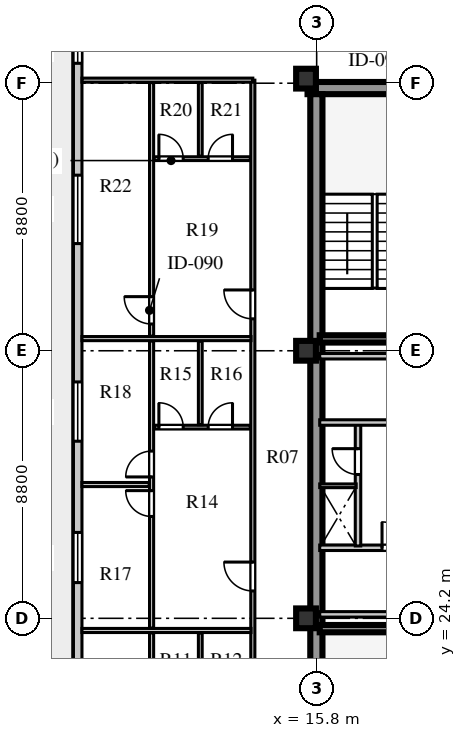
"""IFC4 building model, lengths in metres.
Left out: names, types, materials, properties, quantities, classifications, styles, units other than length and angle.
Written with IfcOpenShell. Run it as: python <this file> out.ifc"""

import sys

from ifc_helpers import new_model, si_unit, direction, frame, frame_2d, origin, origin_2d, place, context, subcontext, project, spatial, rectangle, extrude, element, fill, save


model = new_model("IFC4")
c1 = context("Model", 3, precision=1e-05, world=origin(), true_north=direction((0.0, 1.0)))
c2 = subcontext(c1, "Body", "Model", "MODEL_VIEW")
j1 = project(units=[si_unit("LENGTHUNIT", "METRE"), si_unit("PLANEANGLEUNIT", "RADIAN")], contexts=[c1])
p1 = place(None, origin())
s1 = spatial("IfcSite", under=j1, at=p1, CompositionType="ELEMENT")
p2 = place(p1, origin())
s2 = spatial("IfcBuilding", under=s1, at=p2, CompositionType="ELEMENT")
p3 = place(p2, frame((0.0, 0.0, 229.7)))
s3 = spatial("IfcBuildingStorey", under=s2, at=p3, CompositionType="ELEMENT", Elevation=229.7)
p4 = place(p3, frame((15.5, 41.64, 0.0), z_axis=(0.0, 0.0, 1.0), x_axis=(1.0, 0.0, 0.0)))
e1 = element("IfcWall", 1, at=p4, inside=s3, PredefinedType="SHEAR", context=c2, shape_type="SweptSolid", body=[
    extrude(rectangle(XDim=9.48, YDim=0.4, at=frame_2d((4.74, 0.0))), origin(), (0.0, 0.0, 1.0), 3.66),
])
p5 = place(p3, frame((15.79, 15.81, 0.0), z_axis=(0.0, 0.0, 1.0), x_axis=(0.0, 1.0, 0.0)))
e2 = element("IfcWall", 2, at=p5, inside=s3, PredefinedType="SHEAR", context=c2, shape_type="SweptSolid", body=[
    extrude(rectangle(XDim=25.63, YDim=0.4, at=frame_2d((12.815, 0.0))), origin(), (0.0, 0.0, 1.0), 3.66),
])
for number, where, z_axis, x_axis in (
    (3, (15.45, 24.2, 0.0), (0.0, 0.0, 1.0), (1.0, 0.0, 0.0)),
    (4, (15.45, 33.0, 0.0), (0.0, 0.0, 1.0), (1.0, 0.0, 0.0)),
    (5, (15.45, 41.95, 0.0), (0.0, 0.0, 1.0), (1.0, 0.0, 0.0)),
):
    element("IfcColumn", number, at=place(p3, frame(where, z_axis=z_axis, x_axis=x_axis)), inside=s3, PredefinedType="COLUMN", context=c2, shape_type="SweptSolid", body=[
        extrude(rectangle(XDim=0.65, YDim=0.65, at=origin_2d()), origin(), (0.0, 0.0, 1.0), 3.66),
    ])
p6 = place(p3, frame((7.94, 44.07, 0.0), z_axis=(0.0, 0.0, 1.0), x_axis=(0.0, -1.0, 0.0)))
e6 = element("IfcWall", 6, at=p6, inside=s3, PredefinedType="STANDARD", context=c2, shape_type="SweptSolid", body=[
    extrude(rectangle(XDim=30.94, YDim=0.28, at=frame_2d((15.47, 0.0))), origin(), (0.0, 0.0, 1.0), 3.66),
])
p7 = place(p6, frame((29.325, 0.0, 0.8)))
e7 = element("IfcOpeningElement", 7, at=p7, cuts=e6, PredefinedType="OPENING", context=c2, shape_type="SweptSolid", body=[
    extrude(rectangle(XDim=0.95, YDim=1.65, at=frame_2d((0.475, 0.825))), frame((0.0, 0.15, 0.0), z_axis=(0.0, -1.0, 0.0), x_axis=(1.0, 0.0, 0.0)), (0.0, 0.0, 1.0), 0.3),
])
p8 = place(p6, frame((27.28, 0.0, 0.0)))
e8 = element("IfcOpeningElement", 8, at=p8, cuts=e6, PredefinedType="OPENING", context=c2, shape_type="SweptSolid", body=[
    extrude(rectangle(XDim=1.0, YDim=2.05, at=frame_2d((0.5, 1.025))), frame((0.0, 0.15, 0.0), z_axis=(0.0, -1.0, 0.0), x_axis=(1.0, 0.0, 0.0)), (0.0, 0.0, 1.0), 0.3),
])
p9 = place(p6, frame((23.07, 0.0, 0.8)))
e9 = element("IfcOpeningElement", 9, at=p9, cuts=e6, PredefinedType="OPENING", context=c2, shape_type="SweptSolid", body=[
    extrude(rectangle(XDim=1.35, YDim=1.9, at=frame_2d((0.675, 0.95))), frame((0.0, 0.15, 0.0), z_axis=(0.0, -1.0, 0.0), x_axis=(1.0, 0.0, 0.0)), (0.0, 0.0, 1.0), 0.3),
])
p10 = place(p6, frame((17.045, 0.0, 0.8)))
e10 = element("IfcOpeningElement", 10, at=p10, cuts=e6, PredefinedType="OPENING", context=c2, shape_type="SweptSolid", body=[
    extrude(rectangle(XDim=1.65, YDim=1.95, at=frame_2d((0.825, 0.975))), frame((0.0, 0.15, 0.0), z_axis=(0.0, -1.0, 0.0), x_axis=(1.0, 0.0, 0.0)), (0.0, 0.0, 1.0), 0.3),
])
p11 = place(p6, frame((12.095, 0.0, 0.8)))
e11 = element("IfcOpeningElement", 11, at=p11, cuts=e6, PredefinedType="OPENING", context=c2, shape_type="SweptSolid", body=[
    extrude(rectangle(XDim=1.95, YDim=2.0, at=frame_2d((0.975, 1.0))), frame((0.0, 0.15, 0.0), z_axis=(0.0, -1.0, 0.0), x_axis=(1.0, 0.0, 0.0)), (0.0, 0.0, 1.0), 0.3),
])
p12 = place(p6, frame((5.295, 0.0, 0.8)))
e12 = element("IfcOpeningElement", 12, at=p12, cuts=e6, PredefinedType="OPENING", context=c2, shape_type="SweptSolid", body=[
    extrude(rectangle(XDim=2.25, YDim=2.0, at=frame_2d((1.125, 1.0))), frame((0.0, 0.15, 0.0), z_axis=(0.0, -1.0, 0.0), x_axis=(1.0, 0.0, 0.0)), (0.0, 0.0, 1.0), 0.3),
])
p13 = place(p6, frame((0.665, 0.0, 0.8)))
e13 = element("IfcOpeningElement", 13, at=p13, cuts=e6, PredefinedType="OPENING", context=c2, shape_type="SweptSolid", body=[
    extrude(rectangle(XDim=0.95, YDim=1.65, at=frame_2d((0.475, 0.825))), frame((0.0, 0.15, 0.0), z_axis=(0.0, -1.0, 0.0), x_axis=(1.0, 0.0, 0.0)), (0.0, 0.0, 1.0), 0.3),
])
p14 = place(p3, frame((15.9, 23.86, 0.0), z_axis=(0.0, 0.0, 1.0), x_axis=(1.0, 0.0, 0.0)))
e14 = element("IfcWall", 14, at=p14, inside=s3, PredefinedType="SHEAR", context=c2, shape_type="SweptSolid", body=[
    extrude(rectangle(XDim=3.52, YDim=0.24, at=frame_2d((1.76, 0.0))), origin(), (0.0, 0.0, 1.0), 3.9),
])
p15 = place(p3, frame((15.9, 26.52, 0.0), z_axis=(0.0, 0.0, 1.0), x_axis=(1.0, 0.0, 0.0)))
e15 = element("IfcWall", 15, at=p15, inside=s3, PredefinedType="SOLIDWALL", context=c2, shape_type="SweptSolid", body=[
    extrude(rectangle(XDim=8.68, YDim=0.18, at=frame_2d((4.34, 0.0))), origin(), (0.0, 0.0, 1.0), 3.66),
])
p16 = place(p15, frame((2.05, 0.0, 0.0)))
e16 = element("IfcOpeningElement", 16, at=p16, cuts=e15, PredefinedType="OPENING", context=c2, shape_type="SweptSolid", body=[
    extrude(rectangle(XDim=0.85, YDim=2.06, at=frame_2d((0.425, 1.03))), frame((0.0, 0.1, 0.0), z_axis=(0.0, -1.0, 0.0), x_axis=(1.0, 0.0, 0.0)), (0.0, 0.0, 1.0), 0.2),
])
p17 = place(p15, frame((5.2, 0.0, 0.0)))
e17 = element("IfcOpeningElement", 17, at=p17, cuts=e15, PredefinedType="OPENING", context=c2, shape_type="SweptSolid", body=[
    extrude(rectangle(XDim=0.95, YDim=2.1, at=frame_2d((0.475, 1.05))), frame((0.0, 0.1, 0.0), z_axis=(0.0, -1.0, 0.0), x_axis=(1.0, 0.0, 0.0)), (0.0, 0.0, 1.0), 0.2),
])
p18 = place(p3, frame((15.9, 24.33, 0.0), z_axis=(0.0, 0.0, 1.0), x_axis=(1.0, 0.0, 0.0)))
e18 = element("IfcWall", 18, at=p18, inside=s3, PredefinedType="SOLIDWALL", context=c2, shape_type="SweptSolid", body=[
    extrude(rectangle(XDim=8.68, YDim=0.18, at=frame_2d((4.34, 0.0))), origin(), (0.0, 0.0, 1.0), 3.06),
])
p19 = place(p3, frame((17.16, 26.58, 0.0), z_axis=(0.0, 0.0, 1.0), x_axis=(0.0, 1.0, 0.0)))
e19 = element("IfcWall", 19, at=p19, inside=s3, PredefinedType="SOLIDWALL", context=c2, shape_type="SweptSolid", body=[
    extrude(rectangle(XDim=4.02, YDim=0.18, at=frame_2d((2.01, 0.0))), origin(), (0.0, 0.0, 1.0), 3.66),
])
p20 = place(p19, frame((2.35, 0.0, 0.0)))
e20 = element("IfcOpeningElement", 20, at=p20, cuts=e19, PredefinedType="OPENING", context=c2, shape_type="SweptSolid", body=[
    extrude(rectangle(XDim=0.85, YDim=2.06, at=frame_2d((0.425, 1.03))), frame((0.0, 0.1, 0.0), z_axis=(0.0, -1.0, 0.0), x_axis=(1.0, 0.0, 0.0)), (0.0, 0.0, 1.0), 0.2),
])
p21 = place(p3, frame((15.9, 28.56, 0.0), z_axis=(0.0, 0.0, 1.0), x_axis=(1.0, 0.0, 0.0)))
e21 = element("IfcWall", 21, at=p21, inside=s3, PredefinedType="PARTITIONING", context=c2, shape_type="SweptSolid", body=[
    extrude(rectangle(XDim=1.2, YDim=0.12, at=frame_2d((0.6, 0.0))), origin(), (0.0, 0.0, 1.0), 3.66),
])
p22 = place(p3, frame((15.9, 30.64, 0.0), z_axis=(0.0, 0.0, 1.0), x_axis=(1.0, 0.0, 0.0)))
e22 = element("IfcWall", 22, at=p22, inside=s3, PredefinedType="SOLIDWALL", context=c2, shape_type="SweptSolid", body=[
    extrude(rectangle(XDim=8.68, YDim=0.18, at=frame_2d((4.34, 0.0))), origin(), (0.0, 0.0, 1.0), 3.66),
])
p23 = place(p22, frame((3.7, 0.0, 0.0)))
e23 = element("IfcOpeningElement", 23, at=p23, cuts=e22, PredefinedType="OPENING", context=c2, shape_type="SweptSolid", body=[
    extrude(rectangle(XDim=0.95, YDim=2.1, at=frame_2d((0.475, 1.05))), frame((0.0, 0.1, 0.0), z_axis=(0.0, -1.0, 0.0), x_axis=(1.0, 0.0, 0.0)), (0.0, 0.0, 1.0), 0.2),
])
p24 = place(p3, frame((15.9, 32.82, 0.0), z_axis=(0.0, 0.0, 1.0), x_axis=(1.0, 0.0, 0.0)))
e24 = element("IfcWall", 24, at=p24, inside=s3, PredefinedType="SOLIDWALL", context=c2, shape_type="SweptSolid", body=[
    extrude(rectangle(XDim=8.68, YDim=0.18, at=frame_2d((4.34, 0.0))), origin(), (0.0, 0.0, 1.0), 3.06),
])
p25 = place(p3, frame((15.9, 33.39, 0.0), z_axis=(0.0, 0.0, 1.0), x_axis=(1.0, 0.0, 0.0)))
e25 = element("IfcWall", 25, at=p25, inside=s3, PredefinedType="SHEAR", context=c2, shape_type="SweptSolid", body=[
    extrude(rectangle(XDim=3.52, YDim=0.24, at=frame_2d((1.76, 0.0))), origin(), (0.0, 0.0, 1.0), 3.9),
])
p26 = place(p3, frame((13.7, 15.3, 0.0), z_axis=(0.0, 0.0, 1.0), x_axis=(0.0, 1.0, 0.0)))
e26 = element("IfcWall", 26, at=p26, inside=s3, PredefinedType="PARTITIONING", context=c2, shape_type="SweptSolid", body=[
    extrude(rectangle(XDim=26.6, YDim=0.135, at=frame_2d((13.3, 0.0))), origin(), (0.0, 0.0, 1.0), 3.66),
])
p27 = place(p26, frame((0.65, 0.0, 0.0)))
e27 = element("IfcOpeningElement", 27, at=p27, cuts=e26, PredefinedType="OPENING", context=c2, shape_type="SweptSolid", body=[
    extrude(rectangle(XDim=0.95, YDim=2.1, at=frame_2d((0.475, 1.05))), frame((0.0, 0.078, 0.0), z_axis=(0.0, -1.0, 0.0), x_axis=(1.0, 0.0, 0.0)), (0.0, 0.0, 1.0), 0.155),
])
p28 = place(p26, frame((9.8, 0.0, 0.0)))
e28 = element("IfcOpeningElement", 28, at=p28, cuts=e26, PredefinedType="OPENING", context=c2, shape_type="SweptSolid", body=[
    extrude(rectangle(XDim=0.95, YDim=2.1, at=frame_2d((0.475, 1.05))), frame((0.0, 0.078, 0.0), z_axis=(0.0, -1.0, 0.0), x_axis=(1.0, 0.0, 0.0)), (0.0, 0.0, 1.0), 0.155),
])
p29 = place(p26, frame((18.75, 0.0, 0.0)))
e29 = element("IfcOpeningElement", 29, at=p29, cuts=e26, PredefinedType="OPENING", context=c2, shape_type="SweptSolid", body=[
    extrude(rectangle(XDim=0.95, YDim=2.1, at=frame_2d((0.475, 1.05))), frame((0.0, 0.078, 0.0), z_axis=(0.0, -1.0, 0.0), x_axis=(1.0, 0.0, 0.0)), (0.0, 0.0, 1.0), 0.155),
])
p30 = place(p3, frame((8.08, 41.9, 0.0), z_axis=(0.0, 0.0, 1.0), x_axis=(1.0, 0.0, 0.0)))
e30 = element("IfcWall", 30, at=p30, inside=s3, PredefinedType="PARTITIONING", context=c2, shape_type="SweptSolid", body=[
    extrude(rectangle(XDim=5.62, YDim=0.135, at=frame_2d((2.81, 0.0))), origin(), (0.0, 0.0, 1.0), 3.21),
])
p31 = place(p3, frame((10.37, 15.38, 0.0), z_axis=(0.0, 0.0, 1.0), x_axis=(0.0, 1.0, 0.0)))
e31 = element("IfcWall", 31, at=p31, inside=s3, PredefinedType="PARTITIONING", context=c2, shape_type="SweptSolid", body=[
    extrude(rectangle(XDim=8.34, YDim=0.135, at=frame_2d((4.17, 0.0))), origin(), (0.0, 0.0, 1.0), 3.66),
])
p32 = place(p31, frame((0.4, 0.0, 0.0)))
e32 = element("IfcOpeningElement", 32, at=p32, cuts=e31, PredefinedType="OPENING", context=c2, shape_type="SweptSolid", body=[
    extrude(rectangle(XDim=0.9, YDim=2.08, at=frame_2d((0.45, 1.04))), frame((0.0, 0.078, 0.0), z_axis=(0.0, -1.0, 0.0), x_axis=(1.0, 0.0, 0.0)), (0.0, 0.0, 1.0), 0.155),
])
p33 = place(p3, frame((11.972, 21.298, 0.0), z_axis=(0.0, 0.0, 1.0), x_axis=(0.0, 1.0, 0.0)))
e33 = element("IfcWall", 33, at=p33, inside=s3, PredefinedType="PLUMBINGWALL", context=c2, shape_type="SweptSolid", body=[
    extrude(rectangle(XDim=2.422, YDim=0.125, at=frame_2d((1.211, 0.0))), origin(), (0.0, 0.0, 1.0), 3.66),
])
p34 = place(p3, frame((8.08, 23.8, 0.0), z_axis=(0.0, 0.0, 1.0), x_axis=(1.0, 0.0, 0.0)))
e34 = element("IfcWall", 34, at=p34, inside=s3, PredefinedType="PARTITIONING", context=c2, shape_type="SweptSolid", body=[
    extrude(rectangle(XDim=5.56, YDim=0.135, at=frame_2d((2.78, 0.0))), origin(), (0.0, 0.0, 1.0), 3.66),
])
p35 = place(p3, frame((10.37, 23.88, 0.0), z_axis=(0.0, 0.0, 1.0), x_axis=(0.0, 1.0, 0.0)))
e35 = element("IfcWall", 35, at=p35, inside=s3, PredefinedType="PARTITIONING", context=c2, shape_type="SweptSolid", body=[
    extrude(rectangle(XDim=9.44, YDim=0.135, at=frame_2d((4.72, 0.0))), origin(), (0.0, 0.0, 1.0), 3.66),
])
p36 = place(p35, frame((3.67, 0.0, 0.0)))
e36 = element("IfcOpeningElement", 36, at=p36, cuts=e35, PredefinedType="OPENING", context=c2, shape_type="SweptSolid", body=[
    extrude(rectangle(XDim=0.85, YDim=2.08, at=frame_2d((0.425, 1.04))), frame((0.0, 0.078, 0.0), z_axis=(0.0, -1.0, 0.0), x_axis=(1.0, 0.0, 0.0)), (0.0, 0.0, 1.0), 0.155),
])
p37 = place(p35, frame((4.97, 0.0, 0.0)))
e37 = element("IfcOpeningElement", 37, at=p37, cuts=e35, PredefinedType="OPENING", context=c2, shape_type="SweptSolid", body=[
    extrude(rectangle(XDim=0.85, YDim=2.08, at=frame_2d((0.425, 1.04))), frame((0.0, 0.078, 0.0), z_axis=(0.0, -1.0, 0.0), x_axis=(1.0, 0.0, 0.0)), (0.0, 0.0, 1.0), 0.155),
])
p38 = place(p3, frame((10.45, 30.488, 0.0), z_axis=(0.0, 0.0, 1.0), x_axis=(1.0, 0.0, 0.0)))
e38 = element("IfcWall", 38, at=p38, inside=s3, PredefinedType="PLUMBINGWALL", context=c2, shape_type="SweptSolid", body=[
    extrude(rectangle(XDim=3.17, YDim=0.125, at=frame_2d((1.585, 0.0))), origin(), (0.0, 0.0, 1.0), 3.66),
])
p39 = place(p38, frame((0.16, 0.0, 0.0)))
e39 = element("IfcOpeningElement", 39, at=p39, cuts=e38, PredefinedType="OPENING", context=c2, shape_type="SweptSolid", body=[
    extrude(rectangle(XDim=0.8, YDim=2.05, at=frame_2d((0.4, 1.025))), frame((0.0, 0.073, 0.0), z_axis=(0.0, -1.0, 0.0), x_axis=(1.0, 0.0, 0.0)), (0.0, 0.0, 1.0), 0.145),
])
p40 = place(p38, frame((1.782, 0.0, 0.0)))
e40 = element("IfcOpeningElement", 40, at=p40, cuts=e38, PredefinedType="OPENING", context=c2, shape_type="SweptSolid", body=[
    extrude(rectangle(XDim=0.8, YDim=2.05, at=frame_2d((0.4, 1.025))), frame((0.0, 0.073, 0.0), z_axis=(0.0, -1.0, 0.0), x_axis=(1.0, 0.0, 0.0)), (0.0, 0.0, 1.0), 0.145),
])
p41 = place(p3, frame((11.972, 30.568, 0.0), z_axis=(0.0, 0.0, 1.0), x_axis=(0.0, 1.0, 0.0)))
e41 = element("IfcWall", 41, at=p41, inside=s3, PredefinedType="PLUMBINGWALL", context=c2, shape_type="SweptSolid", body=[
    extrude(rectangle(XDim=2.752, YDim=0.125, at=frame_2d((1.376, 0.0))), origin(), (0.0, 0.0, 1.0), 3.66),
])
p42 = place(p3, frame((8.08, 28.6, 0.0), z_axis=(0.0, 0.0, 1.0), x_axis=(1.0, 0.0, 0.0)))
e42 = element("IfcWall", 42, at=p42, inside=s3, PredefinedType="PARTITIONING", context=c2, shape_type="SweptSolid", body=[
    extrude(rectangle(XDim=2.21, YDim=0.135, at=frame_2d((1.105, 0.0))), origin(), (0.0, 0.0, 1.0), 3.66),
])
p43 = place(p3, frame((8.08, 33.4, 0.0), z_axis=(0.0, 0.0, 1.0), x_axis=(1.0, 0.0, 0.0)))
e43 = element("IfcWall", 43, at=p43, inside=s3, PredefinedType="PARTITIONING", context=c2, shape_type="SweptSolid", body=[
    extrude(rectangle(XDim=5.56, YDim=0.135, at=frame_2d((2.78, 0.0))), origin(), (0.0, 0.0, 1.0), 3.66),
])
p44 = place(p3, frame((10.37, 33.48, 0.0), z_axis=(0.0, 0.0, 1.0), x_axis=(0.0, 1.0, 0.0)))
e44 = element("IfcWall", 44, at=p44, inside=s3, PredefinedType="PARTITIONING", context=c2, shape_type="SweptSolid", body=[
    extrude(rectangle(XDim=8.34, YDim=0.135, at=frame_2d((4.17, 0.0))), origin(), (0.0, 0.0, 1.0), 3.66),
])
p45 = place(p44, frame((0.4, 0.0, 0.0)))
e45 = element("IfcOpeningElement", 45, at=p45, cuts=e44, PredefinedType="OPENING", context=c2, shape_type="SweptSolid", body=[
    extrude(rectangle(XDim=0.9, YDim=2.08, at=frame_2d((0.45, 1.04))), frame((0.0, 0.078, 0.0), z_axis=(0.0, -1.0, 0.0), x_axis=(1.0, 0.0, 0.0)), (0.0, 0.0, 1.0), 0.155),
])
p46 = place(p3, frame((10.45, 39.318, 0.0), z_axis=(0.0, 0.0, 1.0), x_axis=(1.0, 0.0, 0.0)))
e46 = element("IfcWall", 46, at=p46, inside=s3, PredefinedType="PLUMBINGWALL", context=c2, shape_type="SweptSolid", body=[
    extrude(rectangle(XDim=3.17, YDim=0.125, at=frame_2d((1.585, 0.0))), origin(), (0.0, 0.0, 1.0), 3.66),
])
p47 = place(p46, frame((0.16, 0.0, 0.0)))
e47 = element("IfcOpeningElement", 47, at=p47, cuts=e46, PredefinedType="OPENING", context=c2, shape_type="SweptSolid", body=[
    extrude(rectangle(XDim=0.8, YDim=2.05, at=frame_2d((0.4, 1.025))), frame((0.0, 0.073, 0.0), z_axis=(0.0, -1.0, 0.0), x_axis=(1.0, 0.0, 0.0)), (0.0, 0.0, 1.0), 0.145),
])
p48 = place(p46, frame((1.782, 0.0, 0.0)))
e48 = element("IfcOpeningElement", 48, at=p48, cuts=e46, PredefinedType="OPENING", context=c2, shape_type="SweptSolid", body=[
    extrude(rectangle(XDim=0.8, YDim=2.05, at=frame_2d((0.4, 1.025))), frame((0.0, 0.073, 0.0), z_axis=(0.0, -1.0, 0.0), x_axis=(1.0, 0.0, 0.0)), (0.0, 0.0, 1.0), 0.145),
])
p49 = place(p3, frame((11.972, 39.398, 0.0), z_axis=(0.0, 0.0, 1.0), x_axis=(0.0, 1.0, 0.0)))
e49 = element("IfcWall", 49, at=p49, inside=s3, PredefinedType="PLUMBINGWALL", context=c2, shape_type="SweptSolid", body=[
    extrude(rectangle(XDim=2.422, YDim=0.125, at=frame_2d((1.211, 0.0))), origin(), (0.0, 0.0, 1.0), 3.66),
])
p50 = place(p10, origin())
e50 = element("IfcWindow", 50, at=p50, inside=s3, PartitioningType="SINGLE_PANEL", PredefinedType="WINDOW", context=c2, shape_type="SweptSolid", body=[
    extrude(rectangle(XDim=1.65, YDim=1.95, at=frame_2d((0.825, 0.975))), frame((0.0, 0.03, 0.0), z_axis=(0.0, -1.0, 0.0), x_axis=(1.0, 0.0, 0.0)), (0.0, 0.0, 1.0), 0.06),
])
fill(e10, e50)
p51 = place(p11, origin())
e51 = element("IfcWindow", 51, at=p51, inside=s3, PartitioningType="SINGLE_PANEL", PredefinedType="WINDOW", context=c2, shape_type="SweptSolid", body=[
    extrude(rectangle(XDim=1.95, YDim=2.0, at=frame_2d((0.975, 1.0))), frame((0.0, 0.03, 0.0), z_axis=(0.0, -1.0, 0.0), x_axis=(1.0, 0.0, 0.0)), (0.0, 0.0, 1.0), 0.06),
])
fill(e11, e51)
p52 = place(p12, origin())
e52 = element("IfcWindow", 52, at=p52, inside=s3, PartitioningType="SINGLE_PANEL", PredefinedType="WINDOW", context=c2, shape_type="SweptSolid", body=[
    extrude(rectangle(XDim=2.25, YDim=2.0, at=frame_2d((1.125, 1.0))), frame((0.0, 0.03, 0.0), z_axis=(0.0, -1.0, 0.0), x_axis=(1.0, 0.0, 0.0)), (0.0, 0.0, 1.0), 0.06),
])
fill(e12, e52)
p53 = place(p13, origin())
e53 = element("IfcWindow", 53, at=p53, inside=s3, PartitioningType="SINGLE_PANEL", PredefinedType="WINDOW", context=c2, shape_type="SweptSolid", body=[
    extrude(rectangle(XDim=0.95, YDim=1.65, at=frame_2d((0.475, 0.825))), frame((0.0, 0.03, 0.0), z_axis=(0.0, -1.0, 0.0), x_axis=(1.0, 0.0, 0.0)), (0.0, 0.0, 1.0), 0.06),
])
fill(e13, e53)
p54 = place(p16, origin())
e54 = element("IfcDoor", 54, at=p54, inside=s3, OperationType="SINGLE_SWING_LEFT", PredefinedType="DOOR", context=c2, shape_type="SweptSolid", body=[
    extrude(rectangle(XDim=0.85, YDim=2.06, at=frame_2d((0.425, 1.03))), frame((0.0, 0.025, 0.0), z_axis=(0.0, -1.0, 0.0), x_axis=(1.0, 0.0, 0.0)), (0.0, 0.0, 1.0), 0.05),
])
fill(e16, e54)
p55 = place(p20, origin())
e55 = element("IfcDoor", 55, at=p55, inside=s3, OperationType="SINGLE_SWING_RIGHT", PredefinedType="DOOR", context=c2, shape_type="SweptSolid", body=[
    extrude(rectangle(XDim=0.85, YDim=2.06, at=frame_2d((0.425, 1.03))), frame((0.0, 0.025, 0.0), z_axis=(0.0, -1.0, 0.0), x_axis=(1.0, 0.0, 0.0)), (0.0, 0.0, 1.0), 0.05),
])
fill(e20, e55)
p56 = place(p39, origin())
e56 = element("IfcDoor", 56, at=p56, inside=s3, OperationType="SINGLE_SWING_LEFT", PredefinedType="DOOR", context=c2, shape_type="SweptSolid", body=[
    extrude(rectangle(XDim=0.8, YDim=2.05, at=frame_2d((0.4, 1.025))), frame((0.0, 0.025, 0.0), z_axis=(0.0, -1.0, 0.0), x_axis=(1.0, 0.0, 0.0)), (0.0, 0.0, 1.0), 0.05),
])
fill(e39, e56)
p57 = place(p40, origin())
e57 = element("IfcDoor", 57, at=p57, inside=s3, OperationType="SINGLE_SWING_RIGHT", PredefinedType="DOOR", context=c2, shape_type="SweptSolid", body=[
    extrude(rectangle(XDim=0.8, YDim=2.05, at=frame_2d((0.4, 1.025))), frame((0.0, 0.025, 0.0), z_axis=(0.0, -1.0, 0.0), x_axis=(1.0, 0.0, 0.0)), (0.0, 0.0, 1.0), 0.05),
])
fill(e40, e57)
p58 = place(p36, frame((0.85, 0.0, 0.0), z_axis=(0.0, 0.0, 1.0), x_axis=(-1.0, 0.0, 0.0)))
e58 = element("IfcDoor", 58, at=p58, inside=s3, OperationType="SINGLE_SWING_LEFT", PredefinedType="DOOR", context=c2, shape_type="SweptSolid", body=[
    extrude(rectangle(XDim=0.85, YDim=2.08, at=frame_2d((0.425, 1.04))), frame((0.0, 0.025, 0.0), z_axis=(0.0, -1.0, 0.0), x_axis=(1.0, 0.0, 0.0)), (0.0, 0.0, 1.0), 0.05),
])
fill(e36, e58)
p59 = place(p37, frame((0.85, 0.0, 0.0), z_axis=(0.0, 0.0, 1.0), x_axis=(-1.0, 0.0, 0.0)))
e59 = element("IfcDoor", 59, at=p59, inside=s3, OperationType="SINGLE_SWING_RIGHT", PredefinedType="DOOR", context=c2, shape_type="SweptSolid", body=[
    extrude(rectangle(XDim=0.85, YDim=2.08, at=frame_2d((0.425, 1.04))), frame((0.0, 0.025, 0.0), z_axis=(0.0, -1.0, 0.0), x_axis=(1.0, 0.0, 0.0)), (0.0, 0.0, 1.0), 0.05),
])
fill(e37, e59)
p60 = place(p28, frame((0.95, 0.0, 0.0), z_axis=(0.0, 0.0, 1.0), x_axis=(-1.0, 0.0, 0.0)))
e60 = element("IfcDoor", 60, at=p60, inside=s3, OperationType="SINGLE_SWING_LEFT", PredefinedType="DOOR", context=c2, shape_type="SweptSolid", body=[
    extrude(rectangle(XDim=0.95, YDim=2.1, at=frame_2d((0.475, 1.05))), frame((0.0, 0.025, 0.0), z_axis=(0.0, -1.0, 0.0), x_axis=(1.0, 0.0, 0.0)), (0.0, 0.0, 1.0), 0.05),
])
fill(e28, e60)
p61 = place(p47, origin())
e61 = element("IfcDoor", 61, at=p61, inside=s3, OperationType="SINGLE_SWING_LEFT", PredefinedType="DOOR", context=c2, shape_type="SweptSolid", body=[
    extrude(rectangle(XDim=0.8, YDim=2.05, at=frame_2d((0.4, 1.025))), frame((0.0, 0.025, 0.0), z_axis=(0.0, -1.0, 0.0), x_axis=(1.0, 0.0, 0.0)), (0.0, 0.0, 1.0), 0.05),
])
fill(e47, e61)
p62 = place(p48, origin())
e62 = element("IfcDoor", 62, at=p62, inside=s3, OperationType="SINGLE_SWING_RIGHT", PredefinedType="DOOR", context=c2, shape_type="SweptSolid", body=[
    extrude(rectangle(XDim=0.8, YDim=2.05, at=frame_2d((0.4, 1.025))), frame((0.0, 0.025, 0.0), z_axis=(0.0, -1.0, 0.0), x_axis=(1.0, 0.0, 0.0)), (0.0, 0.0, 1.0), 0.05),
])
fill(e48, e62)
p63 = place(p45, frame((0.9, 0.0, 0.0), z_axis=(0.0, 0.0, 1.0), x_axis=(-1.0, 0.0, 0.0)))
e63 = element("IfcDoor", 63, at=p63, inside=s3, OperationType="SINGLE_SWING_LEFT", PredefinedType="DOOR", context=c2, shape_type="SweptSolid", body=[
    extrude(rectangle(XDim=0.9, YDim=2.08, at=frame_2d((0.45, 1.04))), frame((0.0, 0.025, 0.0), z_axis=(0.0, -1.0, 0.0), x_axis=(1.0, 0.0, 0.0)), (0.0, 0.0, 1.0), 0.05),
])
fill(e45, e63)
p64 = place(p29, frame((0.95, 0.0, 0.0), z_axis=(0.0, 0.0, 1.0), x_axis=(-1.0, 0.0, 0.0)))
e64 = element("IfcDoor", 64, at=p64, inside=s3, OperationType="SINGLE_SWING_LEFT", PredefinedType="DOOR", context=c2, shape_type="SweptSolid", body=[
    extrude(rectangle(XDim=0.95, YDim=2.1, at=frame_2d((0.475, 1.05))), frame((0.0, 0.025, 0.0), z_axis=(0.0, -1.0, 0.0), x_axis=(1.0, 0.0, 0.0)), (0.0, 0.0, 1.0), 0.05),
])
fill(e29, e64)
save(model, sys.argv[1])
